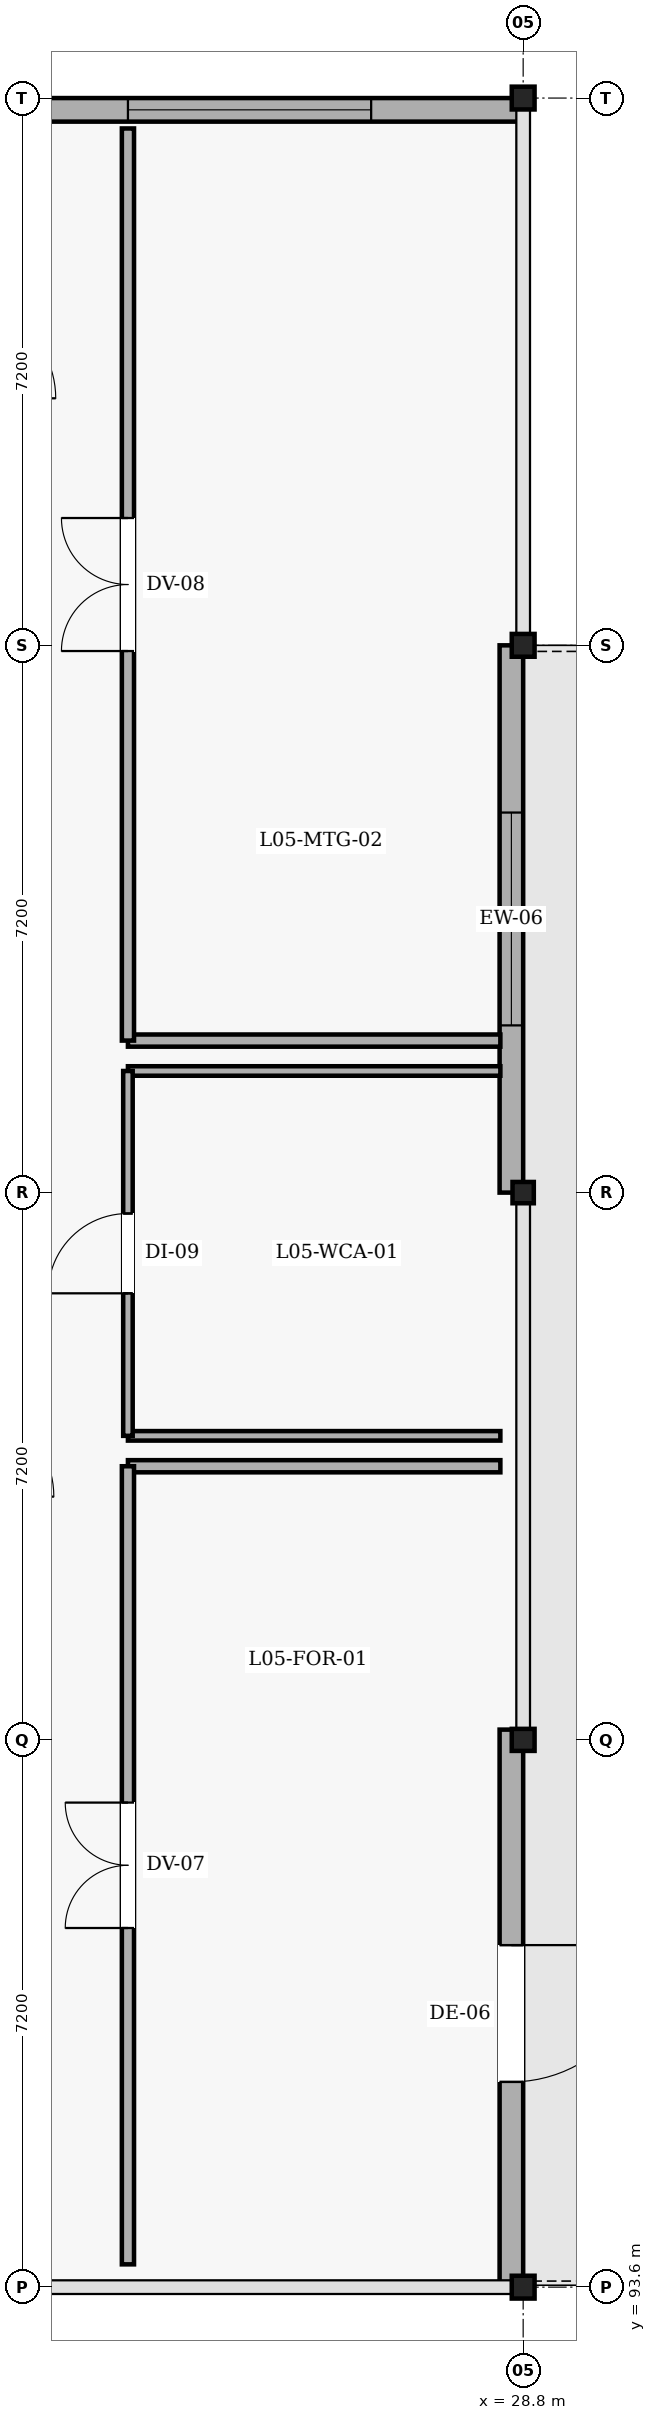
"""IFC4 building model, lengths in metres.
Left out: names, types, materials, properties, quantities, classifications, styles, units other than length and angle.
Written with IfcOpenShell. Run it as: python <this file> out.ifc"""

import sys

from ifc_helpers import new_model, si_unit, direction, frame, frame_2d, origin, origin_2d, place, context, subcontext, project, spatial, rectangle, i_section, extrude, element, fill, save


model = new_model("IFC4")
c1 = context("Model", 3, precision=1e-05, world=origin(), true_north=direction((0.0, 1.0)))
c2 = subcontext(c1, "Body", "Model", "MODEL_VIEW")
j1 = project(units=[si_unit("LENGTHUNIT", "METRE"), si_unit("PLANEANGLEUNIT", "RADIAN")], contexts=[c1])
p1 = place(None, origin())
s1 = spatial("IfcSite", under=j1, at=p1, CompositionType="ELEMENT")
p2 = place(p1, origin())
s2 = spatial("IfcBuilding", under=s1, at=p2, CompositionType="ELEMENT")
p3 = place(p2, frame((0.0, 0.0, 21.6)))
s3 = spatial("IfcBuildingStorey", under=s2, at=p3, CompositionType="ELEMENT", Elevation=21.6)
p4 = place(p3, frame((28.8, 93.6, 0.0), z_axis=(0.0, 0.0, 1.0), x_axis=(1.0, 0.0, 0.0)))
e1 = element("IfcColumn", 1, at=p4, inside=s3, PredefinedType="COLUMN", context=c2, shape_type="SweptSolid", body=[
    extrude(i_section(OverallWidth=0.3, OverallDepth=0.3, WebThickness=0.011, FlangeThickness=0.019, FilletRadius=0.027, at=origin_2d()), origin(), (0.0, 0.0, 1.0), 3.62),
])
p5 = place(p3, frame((28.8, 100.8, 0.0), z_axis=(0.0, 0.0, 1.0), x_axis=(1.0, 0.0, 0.0)))
e2 = element("IfcColumn", 2, at=p5, inside=s3, PredefinedType="COLUMN", context=c2, shape_type="SweptSolid", body=[
    extrude(i_section(OverallWidth=0.3, OverallDepth=0.29, WebThickness=0.009, FlangeThickness=0.014, FilletRadius=0.027, at=origin_2d()), origin(), (0.0, 0.0, 1.0), 3.62),
])
p6 = place(p3, frame((28.8, 108.0, 0.0), z_axis=(0.0, 0.0, 1.0), x_axis=(1.0, 0.0, 0.0)))
e3 = element("IfcColumn", 3, at=p6, inside=s3, PredefinedType="COLUMN", context=c2, shape_type="SweptSolid", body=[
    extrude(i_section(OverallWidth=0.28, OverallDepth=0.28, WebThickness=0.01, FlangeThickness=0.018, FilletRadius=0.024, at=origin_2d()), origin(), (0.0, 0.0, 1.0), 3.62),
])
for number, where, z_axis, x_axis in (
    (4, (28.8, 115.2, 0.0), (0.0, 0.0, 1.0), (1.0, 0.0, 0.0)),
    (5, (28.8, 122.4, 0.0), (0.0, 0.0, 1.0), (1.0, 0.0, 0.0)),
):
    element("IfcColumn", number, at=place(p3, frame(where, z_axis=z_axis, x_axis=x_axis)), inside=s3, PredefinedType="COLUMN", context=c2, shape_type="SweptSolid", body=[
        extrude(i_section(OverallWidth=0.3, OverallDepth=0.3, WebThickness=0.011, FlangeThickness=0.019, FilletRadius=0.027, at=origin_2d()), origin(), (0.0, 0.0, 1.0), 3.62),
    ])
p7 = place(p3, frame((21.6, 122.245, 0.0), z_axis=(0.0, 0.0, 1.0), x_axis=(1.0, 0.0, 0.0)))
e6 = element("IfcWall", 6, at=p7, inside=s3, PredefinedType="SOLIDWALL", context=c2, shape_type="SweptSolid", body=[
    extrude(rectangle(XDim=7.2, YDim=0.31, at=frame_2d((3.6, 0.0))), origin(), (0.0, 0.0, 1.0), 3.32),
])
p8 = place(p7, frame((2.0, 0.0, 0.9)))
e7 = element("IfcOpeningElement", 7, at=p8, cuts=e6, PredefinedType="OPENING", context=c2, shape_type="SweptSolid", body=[
    extrude(rectangle(XDim=3.2, YDim=1.6, at=frame_2d((1.6, 0.8))), frame((0.0, 0.165, 0.0), z_axis=(0.0, -1.0, 0.0), x_axis=(1.0, 0.0, 0.0)), (0.0, 0.0, 1.0), 0.33),
])
p9 = place(p3, frame((28.645, 115.2, 0.0), z_axis=(0.0, 0.0, 1.0), x_axis=(0.0, -1.0, 0.0)))
e8 = element("IfcWall", 8, at=p9, inside=s3, PredefinedType="SOLIDWALL", context=c2, shape_type="SweptSolid", body=[
    extrude(rectangle(XDim=7.2, YDim=0.31, at=frame_2d((3.6, 0.0))), origin(), (0.0, 0.0, 1.0), 3.32),
])
p10 = place(p9, frame((2.2, 0.0, 0.9)))
e9 = element("IfcOpeningElement", 9, at=p10, cuts=e8, PredefinedType="OPENING", context=c2, shape_type="SweptSolid", body=[
    extrude(rectangle(XDim=2.8, YDim=1.6, at=frame_2d((1.4, 0.8))), frame((0.0, 0.165, 0.0), z_axis=(0.0, -1.0, 0.0), x_axis=(1.0, 0.0, 0.0)), (0.0, 0.0, 1.0), 0.33),
])
p11 = place(p3, frame((28.645, 100.935, 0.0), z_axis=(0.0, 0.0, 1.0), x_axis=(0.0, -1.0, 0.0)))
e10 = element("IfcWall", 10, at=p11, inside=s3, PredefinedType="SOLIDWALL", context=c2, shape_type="SweptSolid", body=[
    extrude(rectangle(XDim=7.335, YDim=0.31, at=frame_2d((3.667, 0.0))), origin(), (0.0, 0.0, 1.0), 3.32),
])
p12 = place(p11, frame((2.835, 0.0, 0.0)))
e11 = element("IfcOpeningElement", 11, at=p12, cuts=e10, PredefinedType="OPENING", context=c2, shape_type="SweptSolid", body=[
    extrude(rectangle(XDim=1.8, YDim=2.25, at=frame_2d((0.9, 1.125))), frame((0.0, 0.165, 0.0), z_axis=(0.0, -1.0, 0.0), x_axis=(1.0, 0.0, 0.0)), (0.0, 0.0, 1.0), 0.33),
])
p13 = place(p3, frame((23.6, 104.4, 0.0), z_axis=(0.0, 0.0, 1.0), x_axis=(1.0, 0.0, 0.0)))
e12 = element("IfcWall", 12, at=p13, inside=s3, PredefinedType="PARTITIONING", context=c2, shape_type="SweptSolid", body=[
    extrude(rectangle(XDim=4.9, YDim=0.16, at=frame_2d((2.45, 0.0))), origin(), (0.0, 0.0, 1.0), 3.35),
])
p14 = place(p3, frame((23.6, 93.9, 0.0), z_axis=(0.0, 0.0, 1.0), x_axis=(0.0, 1.0, 0.0)))
e13 = element("IfcWall", 13, at=p14, inside=s3, PredefinedType="PARTITIONING", context=c2, shape_type="SweptSolid", body=[
    extrude(rectangle(XDim=10.5, YDim=0.16, at=frame_2d((5.25, 0.0))), origin(), (0.0, 0.0, 1.0), 3.17),
])
p15 = place(p14, frame((4.425, 0.0, 0.0)))
e14 = element("IfcOpeningElement", 14, at=p15, cuts=e13, PredefinedType="OPENING", context=c2, shape_type="SweptSolid", body=[
    extrude(rectangle(XDim=1.65, YDim=2.25, at=frame_2d((0.825, 1.125))), frame((0.0, 0.09, 0.0), z_axis=(0.0, -1.0, 0.0), x_axis=(1.0, 0.0, 0.0)), (0.0, 0.0, 1.0), 0.18),
])
for number, where, z_axis, x_axis in (
    (15, (23.6, 109.6, 0.0), (0.0, 0.0, 1.0), (1.0, 0.0, 0.0)),
    (16, (28.5, 104.8, 0.0), (0.0, 0.0, 1.0), (-1.0, 0.0, 0.0)),
):
    element("IfcWall", number, at=place(p3, frame(where, z_axis=z_axis, x_axis=x_axis)), inside=s3, PredefinedType="PARTITIONING", context=c2, shape_type="SweptSolid", body=[
        extrude(rectangle(XDim=4.9, YDim=0.125, at=frame_2d((2.45, 0.0))), origin(), (0.0, 0.0, 1.0), 3.55),
    ])
p16 = place(p3, frame((23.6, 104.8, 0.0), z_axis=(0.0, 0.0, 1.0), x_axis=(0.0, 1.0, 0.0)))
e17 = element("IfcWall", 17, at=p16, inside=s3, PredefinedType="PARTITIONING", context=c2, shape_type="SweptSolid", body=[
    extrude(rectangle(XDim=4.8, YDim=0.125, at=frame_2d((2.4, 0.0))), origin(), (0.0, 0.0, 1.0), 3.17),
])
p17 = place(p16, frame((1.875, 0.0, 0.0)))
e18 = element("IfcOpeningElement", 18, at=p17, cuts=e17, PredefinedType="OPENING", context=c2, shape_type="SweptSolid", body=[
    extrude(rectangle(XDim=1.05, YDim=2.1, at=frame_2d((0.525, 1.05))), frame((0.0, 0.073, 0.0), z_axis=(0.0, -1.0, 0.0), x_axis=(1.0, 0.0, 0.0)), (0.0, 0.0, 1.0), 0.145),
])
p18 = place(p3, frame((28.5, 110.0, 0.0), z_axis=(0.0, 0.0, 1.0), x_axis=(-1.0, 0.0, 0.0)))
e19 = element("IfcWall", 19, at=p18, inside=s3, PredefinedType="PARTITIONING", context=c2, shape_type="SweptSolid", body=[
    extrude(rectangle(XDim=4.9, YDim=0.16, at=frame_2d((2.45, 0.0))), origin(), (0.0, 0.0, 1.0), 3.55),
])
p19 = place(p3, frame((23.6, 110.0, 0.0), z_axis=(0.0, 0.0, 1.0), x_axis=(0.0, 1.0, 0.0)))
e20 = element("IfcWall", 20, at=p19, inside=s3, PredefinedType="PARTITIONING", context=c2, shape_type="SweptSolid", body=[
    extrude(rectangle(XDim=12.0, YDim=0.16, at=frame_2d((6.0, 0.0))), origin(), (0.0, 0.0, 1.0), 3.17),
])
p20 = place(p19, frame((5.125, 0.0, 0.0)))
e21 = element("IfcOpeningElement", 21, at=p20, cuts=e20, PredefinedType="OPENING", context=c2, shape_type="SweptSolid", body=[
    extrude(rectangle(XDim=1.75, YDim=2.25, at=frame_2d((0.875, 1.125))), frame((0.0, 0.09, 0.0), z_axis=(0.0, -1.0, 0.0), x_axis=(1.0, 0.0, 0.0)), (0.0, 0.0, 1.0), 0.18),
])
p21 = place(p8, origin())
e22 = element("IfcWindow", 22, at=p21, inside=s3, PartitioningType="SINGLE_PANEL", PredefinedType="WINDOW", context=c2, shape_type="SweptSolid", body=[
    extrude(rectangle(XDim=3.2, YDim=1.6, at=frame_2d((1.6, 0.8))), frame((0.0, 0.03, 0.0), z_axis=(0.0, -1.0, 0.0), x_axis=(1.0, 0.0, 0.0)), (0.0, 0.0, 1.0), 0.06),
])
fill(e7, e22)
p22 = place(p10, origin())
e23 = element("IfcWindow", 23, at=p22, inside=s3, PartitioningType="SINGLE_PANEL", PredefinedType="WINDOW", context=c2, shape_type="SweptSolid", body=[
    extrude(rectangle(XDim=2.8, YDim=1.6, at=frame_2d((1.4, 0.8))), frame((0.0, 0.03, 0.0), z_axis=(0.0, -1.0, 0.0), x_axis=(1.0, 0.0, 0.0)), (0.0, 0.0, 1.0), 0.06),
])
fill(e9, e23)
p23 = place(p12, origin())
e24 = element("IfcDoor", 24, at=p23, inside=s3, OperationType="SINGLE_SWING_LEFT", PredefinedType="DOOR", context=c2, shape_type="SweptSolid", body=[
    extrude(rectangle(XDim=1.8, YDim=2.25, at=frame_2d((0.9, 1.125))), frame((0.0, 0.025, 0.0), z_axis=(0.0, -1.0, 0.0), x_axis=(1.0, 0.0, 0.0)), (0.0, 0.0, 1.0), 0.05),
])
fill(e11, e24)
p24 = place(p15, origin())
e25 = element("IfcDoor", 25, at=p24, inside=s3, OperationType="DOUBLE_DOOR_SINGLE_SWING", PredefinedType="DOOR", context=c2, shape_type="SweptSolid", body=[
    extrude(rectangle(XDim=1.65, YDim=2.25, at=frame_2d((0.825, 1.125))), frame((0.0, 0.025, 0.0), z_axis=(0.0, -1.0, 0.0), x_axis=(1.0, 0.0, 0.0)), (0.0, 0.0, 1.0), 0.05),
])
fill(e14, e25)
p25 = place(p17, origin())
e26 = element("IfcDoor", 26, at=p25, inside=s3, OperationType="SINGLE_SWING_LEFT", PredefinedType="DOOR", context=c2, shape_type="SweptSolid", body=[
    extrude(rectangle(XDim=1.05, YDim=2.1, at=frame_2d((0.525, 1.05))), frame((0.0, 0.025, 0.0), z_axis=(0.0, -1.0, 0.0), x_axis=(1.0, 0.0, 0.0)), (0.0, 0.0, 1.0), 0.05),
])
fill(e18, e26)
p26 = place(p20, origin())
e27 = element("IfcDoor", 27, at=p26, inside=s3, OperationType="DOUBLE_DOOR_SINGLE_SWING", PredefinedType="DOOR", context=c2, shape_type="SweptSolid", body=[
    extrude(rectangle(XDim=1.75, YDim=2.25, at=frame_2d((0.875, 1.125))), frame((0.0, 0.025, 0.0), z_axis=(0.0, -1.0, 0.0), x_axis=(1.0, 0.0, 0.0)), (0.0, 0.0, 1.0), 0.05),
])
fill(e21, e27)
save(model, sys.argv[1])
